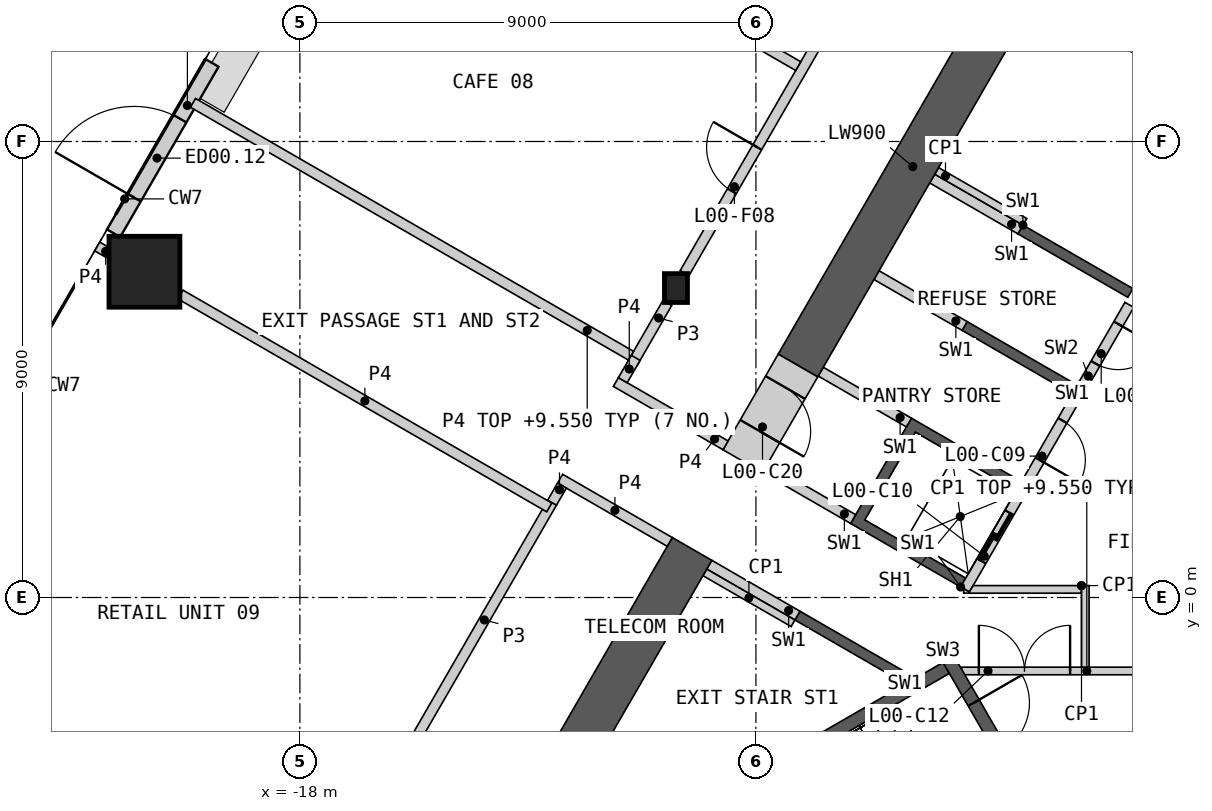
"""IFC4 building model, lengths in metres.
Left out: names, types, materials, properties, quantities, classifications, styles, units other than length and angle.
Written with IfcOpenShell. Run it as: python <this file> out.ifc"""

import sys

from ifc_helpers import new_model, si_unit, direction, frame, frame_2d, origin, origin_2d, place, context, subcontext, project, spatial, polyline, rectangle, hollow_rectangle, i_section, outline, extrude, element, fill, save


model = new_model("IFC4")
c1 = context("Model", 3, precision=1e-05, world=origin(), true_north=direction((0.0, 1.0)))
c2 = subcontext(c1, "Body", "Model", "MODEL_VIEW")
j1 = project(units=[si_unit("LENGTHUNIT", "METRE"), si_unit("PLANEANGLEUNIT", "RADIAN")], contexts=[c1])
p1 = place(None, origin())
s1 = spatial("IfcSite", under=j1, at=p1, CompositionType="ELEMENT")
p2 = place(p1, origin())
s2 = spatial("IfcBuilding", under=s1, at=p2, CompositionType="ELEMENT")
p3 = place(p2, origin())
s3 = spatial("IfcBuildingStorey", under=s2, at=p3, CompositionType="ELEMENT", Elevation=0.0)
p4 = place(p3, frame((-21.068, 6.429, 0.0), z_axis=(0.0, 0.0, 1.0), x_axis=(1.0, 0.0, 0.0)))
e1 = element("IfcColumn", 1, at=p4, inside=s3, PredefinedType="COLUMN", context=c2, shape_type="SweptSolid", body=[
    extrude(hollow_rectangle(XDim=1.4, YDim=1.4, WallThickness=0.1, at=origin_2d()), origin(), (0.0, 0.0, 1.0), 10.0),
])
p5 = place(p3, frame((-10.578, 6.107, 0.0), z_axis=(0.0, 0.0, 1.0), x_axis=(1.0, 0.0, 0.0)))
e2 = element("IfcColumn", 2, at=p5, inside=s3, PredefinedType="COLUMN", context=c2, shape_type="SweptSolid", body=[
    extrude(i_section(OverallWidth=0.454, OverallDepth=0.57, WebThickness=0.078, FlangeThickness=0.125, at=origin_2d()), origin(), (0.0, 0.0, 1.0), 10.0),
])
p6 = place(p3, frame((-21.676, 7.189, 0.0), z_axis=(0.0, 0.0, 1.0), x_axis=(0.499994660107, 0.866028486751, 0.0)))
e3 = element("IfcWall", 3, at=p6, inside=s3, PredefinedType="SOLIDWALL", context=c2, shape_type="SweptSolid", body=[
    extrude(rectangle(XDim=3.882, YDim=0.3, at=frame_2d((1.941, 0.0))), origin(), (0.0, 0.0, 1.0), 4.6),
])
p7 = place(p6, frame((0.812, 0.0, 0.0)))
e4 = element("IfcOpeningElement", 4, at=p7, cuts=e3, PredefinedType="OPENING", context=c2, shape_type="SweptSolid", body=[
    extrude(rectangle(XDim=1.8, YDim=2.4, at=frame_2d((0.9, 1.2))), frame((0.0, 0.16, 0.0), z_axis=(0.0, -1.0, 0.0), x_axis=(1.0, 0.0, 0.0)), (0.0, 0.0, 1.0), 0.32),
])
p8 = place(p3, origin())
e5 = element("IfcWall", 5, at=p8, inside=s3, PredefinedType="SHEAR", context=c2, shape_type="SweptSolid", body=[
    extrude(outline(polyline([(-6.061, -1.697), (-8.231, -0.444), (-8.131, -0.271), (-5.96, -1.524), (-6.061, -1.697)])), origin(), (0.0, 0.0, 1.0), 9.55),
])
p9 = place(p3, origin())
e6 = element("IfcWall", 6, at=p9, inside=s3, PredefinedType="SHEAR", context=c2, shape_type="SweptSolid", body=[
    extrude(outline(polyline([(-4.96, 0.208), (-7.131, 1.461), (-5.931, 3.54), (-3.76, 2.287), (-3.861, 2.113), (-5.852, 3.263), (-6.852, 1.531), (-4.861, 0.381), (-4.96, 0.208)])), origin(), (0.0, 0.0, 1.0), 9.55),
])
p10 = place(p3, origin())
e7 = element("IfcWall", 7, at=p10, inside=s3, PredefinedType="SHEAR", context=c2, shape_type="SweptSolid", body=[
    extrude(outline(polyline([(-2.76, 4.019), (-4.931, 5.272), (-4.831, 5.445), (-2.66, 4.192), (-2.76, 4.019)])), origin(), (0.0, 0.0, 1.0), 9.55),
])
p11 = place(p3, origin())
e8 = element("IfcWall", 8, at=p11, inside=s3, PredefinedType="SHEAR", context=c2, shape_type="SweptSolid", body=[
    extrude(outline(polyline([(-3.731, 7.35), (-1.561, 6.097), (-1.66, 5.924), (-3.831, 7.177), (-3.731, 7.35)])), origin(), (0.0, 0.0, 1.0), 9.55),
])
p12 = place(p3, frame((-1.631, 5.776, 0.0), z_axis=(0.0, 0.0, 1.0), x_axis=(-0.499992876559, -0.866029516466, 0.0)))
e9 = element("IfcWall", 9, at=p12, inside=s3, PredefinedType="SOLIDWALL", context=c2, shape_type="SweptSolid", body=[
    extrude(rectangle(XDim=6.486, YDim=0.2, at=frame_2d((3.243, 0.0))), origin(), (0.0, 0.0, 1.0), 9.55),
])
p13 = place(p12, frame((0.437, 0.0, 0.0)))
e10 = element("IfcOpeningElement", 10, at=p13, cuts=e9, PredefinedType="OPENING", context=c2, shape_type="SweptSolid", body=[
    extrude(rectangle(XDim=0.9, YDim=2.1, at=frame_2d((0.45, 1.05))), frame((0.0, 0.11, 0.0), z_axis=(0.0, -1.0, 0.0), x_axis=(1.0, 0.0, 0.0)), (0.0, 0.0, 1.0), 0.22),
])
p14 = place(p12, frame((2.637, 0.0, 0.0)))
e11 = element("IfcOpeningElement", 11, at=p14, cuts=e9, PredefinedType="OPENING", context=c2, shape_type="SweptSolid", body=[
    extrude(rectangle(XDim=0.9, YDim=2.1, at=frame_2d((0.45, 1.05))), frame((0.0, 0.11, 0.0), z_axis=(0.0, -1.0, 0.0), x_axis=(1.0, 0.0, 0.0)), (0.0, 0.0, 1.0), 0.22),
])
p15 = place(p12, frame((4.737, 0.0, 0.0)))
e12 = element("IfcOpeningElement", 12, at=p15, cuts=e9, PredefinedType="OPENING", context=c2, shape_type="SweptSolid", body=[
    extrude(rectangle(XDim=1.1, YDim=2.1, at=frame_2d((0.55, 1.05))), frame((0.0, 0.11, 0.0), z_axis=(0.0, -1.0, 0.0), x_axis=(1.0, 0.0, 0.0)), (0.0, 0.0, 1.0), 0.22),
])
p16 = place(p3, frame((-3.781, 7.263, 0.0), z_axis=(0.0, 0.0, 1.0), x_axis=(-0.865983199114, 0.50007309351, 0.0)))
e13 = element("IfcWall", 13, at=p16, inside=s3, PredefinedType="SHEAR", context=c2, shape_type="SweptSolid", body=[
    extrude(rectangle(XDim=2.009, YDim=0.2, at=frame_2d((1.004, 0.0))), origin(), (0.0, 0.0, 1.0), 9.55),
])
p17 = place(p3, frame((-4.881, 5.358, 0.0), z_axis=(0.0, 0.0, 1.0), x_axis=(-0.866035824272, 0.499981950752, 0.0)))
e14 = element("IfcWall", 14, at=p17, inside=s3, PredefinedType="SHEAR", context=c2, shape_type="SweptSolid", body=[
    extrude(rectangle(XDim=2.009, YDim=0.2, at=frame_2d((1.004, 0.0))), origin(), (0.0, 0.0, 1.0), 9.55),
])
p18 = place(p3, frame((-5.981, 3.453, 0.0), z_axis=(0.0, 0.0, 1.0), x_axis=(-0.866013584312, 0.500020471368, 0.0)))
e15 = element("IfcWall", 15, at=p18, inside=s3, PredefinedType="SHEAR", context=c2, shape_type="SweptSolid", body=[
    extrude(rectangle(XDim=2.009, YDim=0.2, at=frame_2d((1.005, 0.0))), origin(), (0.0, 0.0, 1.0), 9.55),
])
p19 = place(p3, frame((-7.081, 1.548, 0.0), z_axis=(0.0, 0.0, 1.0), x_axis=(-0.865983199114, 0.50007309351, 0.0)))
e16 = element("IfcWall", 16, at=p19, inside=s3, PredefinedType="SHEAR", context=c2, shape_type="SweptSolid", body=[
    extrude(rectangle(XDim=2.009, YDim=0.2, at=frame_2d((1.004, 0.0))), origin(), (0.0, 0.0, 1.0), 9.55),
])
p20 = place(p3, frame((-8.181, -0.357, 0.0), z_axis=(0.0, 0.0, 1.0), x_axis=(-0.866035824272, 0.499981950752, 0.0)))
e17 = element("IfcWall", 17, at=p20, inside=s3, PredefinedType="SHEAR", context=c2, shape_type="SweptSolid", body=[
    extrude(rectangle(XDim=2.009, YDim=0.2, at=frame_2d((1.004, 0.0))), origin(), (0.0, 0.0, 1.0), 9.55),
])
p21 = place(p3, frame((-4.941, -1.45, 0.0), z_axis=(0.0, 0.0, 1.0), x_axis=(1.0, 0.0, 0.0)))
e18 = element("IfcWall", 18, at=p21, inside=s3, PredefinedType="PARTITIONING", context=c2, shape_type="SweptSolid", body=[
    extrude(rectangle(XDim=9.882, YDim=0.15, at=frame_2d((4.941, 0.0))), origin(), (0.0, 0.0, 1.0), 9.55),
])
p22 = place(p21, frame((4.391, 0.0, 0.0)))
e19 = element("IfcOpeningElement", 19, at=p22, cuts=e18, PredefinedType="OPENING", context=c2, shape_type="SweptSolid", body=[
    extrude(rectangle(XDim=1.1, YDim=2.1, at=frame_2d((0.55, 1.05))), frame((0.0, 0.085, 0.0), z_axis=(0.0, -1.0, 0.0), x_axis=(1.0, 0.0, 0.0)), (0.0, 0.0, 1.0), 0.17),
])
p23 = place(p21, frame((0.341, 0.0, 0.0)))
e20 = element("IfcOpeningElement", 20, at=p23, cuts=e18, PredefinedType="OPENING", context=c2, shape_type="SweptSolid", body=[
    extrude(rectangle(XDim=1.8, YDim=2.1, at=frame_2d((0.9, 1.05))), frame((0.0, 0.085, 0.0), z_axis=(0.0, -1.0, 0.0), x_axis=(1.0, 0.0, 0.0)), (0.0, 0.0, 1.0), 0.17),
])
p24 = place(p3, origin())
e21 = element("IfcWall", 21, at=p24, inside=s3, PredefinedType="PARTITIONING", context=c2, shape_type="SweptSolid", body=[
    extrude(outline(polyline([(-2.575, 0.235), (-2.575, 0.085), (-4.9, 0.085), (-4.9, 0.173), (-4.787, 0.108), (-4.714, 0.235), (-2.575, 0.235)])), origin(), (0.0, 0.0, 1.0), 9.55),
])
p25 = place(p3, origin())
e22 = element("IfcWall", 22, at=p25, inside=s3, PredefinedType="PARTITIONING", context=c2, shape_type="SweptSolid", body=[
    extrude(outline(polyline([(-2.575, 0.235), (-2.425, 0.235), (-2.425, -1.375), (-2.575, -1.375), (-2.575, 0.235)])), origin(), (0.0, 0.0, 1.0), 9.55),
])
p26 = place(p3, origin())
e23 = element("IfcWall", 23, at=p26, inside=s3, PredefinedType="SHEAR", context=c2, shape_type="SweptSolid", body=[
    extrude(outline(polyline([(-5.307, -1.281), (-10.374, -4.206), (-10.032, -4.298), (-5.182, -1.498), (-5.307, -1.281)])), origin(), (0.0, 0.0, 1.0), 9.55),
])
p27 = place(p3, frame((-5.199, -1.219, 0.0), z_axis=(0.0, 0.0, 1.0), x_axis=(0.499982516597, -0.866035497597, 0.0)))
e24 = element("IfcWall", 24, at=p27, inside=s3, PredefinedType="SHEAR", context=c2, shape_type="SweptSolid", body=[
    extrude(rectangle(XDim=3.088, YDim=0.25, at=frame_2d((1.544, 0.0))), origin(), (0.0, 0.0, 1.0), 9.55),
])
p28 = place(p27, frame((0.994, 0.0, 0.0)))
e25 = element("IfcOpeningElement", 25, at=p28, cuts=e24, PredefinedType="OPENING", context=c2, shape_type="SweptSolid", body=[
    extrude(rectangle(XDim=1.1, YDim=2.1, at=frame_2d((0.55, 1.05))), frame((0.0, 0.135, 0.0), z_axis=(0.0, -1.0, 0.0), x_axis=(1.0, 0.0, 0.0)), (0.0, 0.0, 1.0), 0.27),
])
for number, where, z_axis, x_axis in (
    (26, (-8.268, -0.509, 0.0), (0.0, 0.0, 1.0), (-0.866, 0.5, 0.0)),
    (27, (-3.693, 7.415, 0.0), (0.0, 0.0, 1.0), (-0.866, 0.5, 0.0)),
):
    element("IfcWall", number, at=place(p3, frame(where, z_axis=z_axis, x_axis=x_axis)), inside=s3, PredefinedType="PARTITIONING", context=c2, shape_type="SweptSolid", body=[
        extrude(rectangle(XDim=2.009, YDim=0.15, at=frame_2d((1.004, 0.0))), origin(), (0.0, 0.0, 1.0), 9.55),
    ])
p29 = place(p3, frame((-3.637, 12.43, 0.0), z_axis=(0.0, 0.0, 1.0), x_axis=(-0.500011513458, -0.866018756384, 0.0)))
e28 = element("IfcWall", 28, at=p29, inside=s3, PredefinedType="SHEAR", context=c2, shape_type="SweptSolid", body=[
    extrude(rectangle(XDim=9.066, YDim=0.9, at=frame_2d((4.533, 0.0))), origin(), (0.0, 0.0, 1.0), 9.55),
])
p30 = place(p3, frame((-10.26, 0.958, 0.0), z_axis=(0.0, 0.0, 1.0), x_axis=(-0.499993887256, -0.86602893295, 0.0)))
e29 = element("IfcWall", 29, at=p30, inside=s3, PredefinedType="SHEAR", context=c2, shape_type="SweptSolid", body=[
    extrude(rectangle(XDim=4.646, YDim=0.9, at=frame_2d((2.323, 0.0))), origin(), (0.0, 0.0, 1.0), 9.55),
])
p31 = place(p3, frame((-8.17, 4.579, 0.0), z_axis=(0.0, 0.0, 1.0), x_axis=(-0.499945432413, -0.866056906104, 0.0)))
e30 = element("IfcWall", 30, at=p31, inside=s3, PredefinedType="SHEAR", context=c2, shape_type="SweptSolid", body=[
    extrude(rectangle(XDim=2.18, YDim=0.9, at=frame_2d((1.09, 0.0))), origin(), (0.0, 0.0, 1.0), 9.55),
])
p32 = place(p31, frame((0.5, 0.0, 0.0)))
e31 = element("IfcOpeningElement", 31, at=p32, cuts=e30, PredefinedType="OPENING", context=c2, shape_type="SweptSolid", body=[
    extrude(rectangle(XDim=1.0, YDim=2.1, at=frame_2d((0.5, 1.05))), frame((0.0, 0.46, 0.0), z_axis=(0.0, -1.0, 0.0), x_axis=(1.0, 0.0, 0.0)), (0.0, 0.0, 1.0), 0.92),
])
p33 = place(p3, frame((-10.408, 6.402, 0.0), z_axis=(0.0, 0.0, 1.0), x_axis=(0.499985793049, 0.866033606016, 0.0)))
e32 = element("IfcWall", 32, at=p33, inside=s3, PredefinedType="PARTITIONING", context=c2, shape_type="SweptSolid", body=[
    extrude(rectangle(XDim=9.898, YDim=0.2, at=frame_2d((4.949, 0.0))), origin(), (0.0, 0.0, 1.0), 9.55),
])
p34 = place(p33, frame((1.869, 0.0, 0.0)))
e33 = element("IfcOpeningElement", 33, at=p34, cuts=e32, PredefinedType="OPENING", context=c2, shape_type="SweptSolid", body=[
    extrude(rectangle(XDim=1.0, YDim=2.1, at=frame_2d((0.5, 1.05))), frame((0.0, 0.11, 0.0), z_axis=(0.0, -1.0, 0.0), x_axis=(1.0, 0.0, 0.0)), (0.0, 0.0, 1.0), 0.22),
])
p35 = place(p3, frame((-15.698, -2.759, 0.0), z_axis=(0.0, 0.0, 1.0), x_axis=(0.500125484666, 0.865952943056, 0.0)))
e34 = element("IfcWall", 34, at=p35, inside=s3, PredefinedType="PARTITIONING", context=c2, shape_type="SweptSolid", body=[
    extrude(rectangle(XDim=5.348, YDim=0.2, at=frame_2d((2.674, 0.0))), origin(), (0.0, 0.0, 1.0), 9.55),
])
p36 = place(p3, frame((-11.432, 4.627, 0.0), z_axis=(0.0, 0.0, 1.0), x_axis=(0.499650385877, 0.866227159522, 0.0)))
e35 = element("IfcWall", 35, at=p36, inside=s3, PredefinedType="PARTITIONING", context=c2, shape_type="SweptSolid", body=[
    extrude(rectangle(XDim=1.369, YDim=0.2, at=frame_2d((0.684, 0.0))), origin(), (0.0, 0.0, 1.0), 9.55),
])
p37 = place(p3, frame((-15.392, 14.66, 0.0), z_axis=(0.0, 0.0, 1.0), x_axis=(0.866027244746, -0.499996811348, 0.0)))
e36 = element("IfcWall", 36, at=p37, inside=s3, PredefinedType="PARTITIONING", context=c2, shape_type="SweptSolid", body=[
    extrude(rectangle(XDim=8.345, YDim=0.2, at=frame_2d((4.172, 0.0))), origin(), (0.0, 0.0, 1.0), 9.55),
])
p38 = place(p3, frame((-20.109, 9.763, 0.0), z_axis=(0.0, 0.0, 1.0), x_axis=(0.866017364883, -0.500013923527, 0.0)))
e37 = element("IfcWall", 37, at=p38, inside=s3, PredefinedType="PARTITIONING", context=c2, shape_type="SweptSolid", body=[
    extrude(rectangle(XDim=9.982, YDim=0.2, at=frame_2d((4.991, 0.0))), origin(), (0.0, 0.0, 1.0), 9.55),
])
p39 = place(p3, frame((-20.358, 5.98, 0.0), z_axis=(0.0, 0.0, 1.0), x_axis=(0.866028870366, -0.499993995656, 0.0)))
e38 = element("IfcWall", 38, at=p39, inside=s3, PredefinedType="PARTITIONING", context=c2, shape_type="SweptSolid", body=[
    extrude(rectangle(XDim=8.405, YDim=0.2, at=frame_2d((4.203, 0.0))), origin(), (0.0, 0.0, 1.0), 9.55),
])
p40 = place(p3, frame((-11.764, 4.253, 0.0), z_axis=(0.0, 0.0, 1.0), x_axis=(0.86600986831, -0.500026907266, 0.0)))
e39 = element("IfcWall", 39, at=p40, inside=s3, PredefinedType="PARTITIONING", context=c2, shape_type="SweptSolid", body=[
    extrude(rectangle(XDim=2.499, YDim=0.2, at=frame_2d((1.25, 0.0))), origin(), (0.0, 0.0, 1.0), 9.55),
])
p41 = place(p3, frame((-12.865, 2.346, 0.0), z_axis=(0.0, 0.0, 1.0), x_axis=(0.866034292756, -0.499984603534, 0.0)))
e40 = element("IfcWall", 40, at=p41, inside=s3, PredefinedType="PARTITIONING", context=c2, shape_type="SweptSolid", body=[
    extrude(rectangle(XDim=2.499, YDim=0.2, at=frame_2d((1.25, 0.0))), origin(), (0.0, 0.0, 1.0), 9.55),
])
p42 = place(p3, frame((-11.627, 4.289, 0.0), z_axis=(0.0, 0.0, 1.0), x_axis=(0.499750133086, 0.866169616461, 0.0)))
e41 = element("IfcWall", 41, at=p42, inside=s3, PredefinedType="PARTITIONING", context=c2, shape_type="SweptSolid", body=[
    extrude(rectangle(XDim=0.509, YDim=0.2, at=frame_2d((0.254, 0.0))), origin(), (0.0, 0.0, 1.0), 9.55),
])
p43 = place(p3, frame((-13.023, 1.872, 0.0), z_axis=(0.0, 0.0, 1.0), x_axis=(0.500392655802, 0.865798585133, 0.0)))
e42 = element("IfcWall", 42, at=p43, inside=s3, PredefinedType="PARTITIONING", context=c2, shape_type="SweptSolid", body=[
    extrude(rectangle(XDim=0.389, YDim=0.2, at=frame_2d((0.194, 0.0))), origin(), (0.0, 0.0, 1.0), 9.55),
])
p44 = place(p3, frame((-22.0, 6.928, 0.0), z_axis=(0.0, 0.0, 1.0), x_axis=(0.866185586049, -0.49972245349, 0.0)))
e43 = element("IfcWall", 43, at=p44, inside=s3, PredefinedType="PARTITIONING", context=c2, shape_type="SweptSolid", body=[
    extrude(rectangle(XDim=0.257, YDim=0.2, at=frame_2d((0.128, 0.0))), origin(), (0.0, 0.0, 1.0), 9.55),
])
p45 = place(p7, origin())
e44 = element("IfcDoor", 44, at=p45, inside=s3, OperationType="DOUBLE_DOOR_SINGLE_SWING", PredefinedType="DOOR", context=c2, shape_type="SweptSolid", body=[
    extrude(rectangle(XDim=1.8, YDim=2.4, at=frame_2d((0.9, 1.2))), frame((0.0, 0.025, 0.0), z_axis=(0.0, -1.0, 0.0), x_axis=(1.0, 0.0, 0.0)), (0.0, 0.0, 1.0), 0.05),
])
fill(e4, e44)
p46 = place(p13, origin())
e45 = element("IfcDoor", 45, at=p46, inside=s3, OperationType="SINGLE_SWING_LEFT", PredefinedType="DOOR", context=c2, shape_type="SweptSolid", body=[
    extrude(rectangle(XDim=0.9, YDim=2.1, at=frame_2d((0.45, 1.05))), frame((0.0, 0.025, 0.0), z_axis=(0.0, -1.0, 0.0), x_axis=(1.0, 0.0, 0.0)), (0.0, 0.0, 1.0), 0.05),
])
fill(e10, e45)
p47 = place(p14, origin())
e46 = element("IfcDoor", 46, at=p47, inside=s3, OperationType="SINGLE_SWING_RIGHT", PredefinedType="DOOR", context=c2, shape_type="SweptSolid", body=[
    extrude(rectangle(XDim=0.9, YDim=2.1, at=frame_2d((0.45, 1.05))), frame((0.0, 0.025, 0.0), z_axis=(0.0, -1.0, 0.0), x_axis=(1.0, 0.0, 0.0)), (0.0, 0.0, 1.0), 0.05),
])
fill(e11, e46)
p48 = place(p15, origin())
e47 = element("IfcDoor", 47, at=p48, inside=s3, OperationType="SLIDING_TO_LEFT", PredefinedType="DOOR", context=c2, shape_type="SweptSolid", body=[
    extrude(rectangle(XDim=1.1, YDim=2.1, at=frame_2d((0.55, 1.05))), frame((0.0, 0.025, 0.0), z_axis=(0.0, -1.0, 0.0), x_axis=(1.0, 0.0, 0.0)), (0.0, 0.0, 1.0), 0.05),
])
fill(e12, e47)
p49 = place(p23, origin())
e48 = element("IfcDoor", 48, at=p49, inside=s3, OperationType="DOUBLE_DOOR_SINGLE_SWING", PredefinedType="DOOR", context=c2, shape_type="SweptSolid", body=[
    extrude(rectangle(XDim=1.8, YDim=2.1, at=frame_2d((0.9, 1.05))), frame((0.0, 0.025, 0.0), z_axis=(0.0, -1.0, 0.0), x_axis=(1.0, 0.0, 0.0)), (0.0, 0.0, 1.0), 0.05),
])
fill(e20, e48)
p50 = place(p28, origin())
e49 = element("IfcDoor", 49, at=p50, inside=s3, OperationType="SINGLE_SWING_LEFT", PredefinedType="DOOR", context=c2, shape_type="SweptSolid", body=[
    extrude(rectangle(XDim=1.1, YDim=2.1, at=frame_2d((0.55, 1.05))), frame((0.0, 0.025, 0.0), z_axis=(0.0, -1.0, 0.0), x_axis=(1.0, 0.0, 0.0)), (0.0, 0.0, 1.0), 0.05),
])
fill(e25, e49)
p51 = place(p32, origin())
e50 = element("IfcDoor", 50, at=p51, inside=s3, OperationType="SINGLE_SWING_RIGHT", PredefinedType="DOOR", context=c2, shape_type="SweptSolid", body=[
    extrude(rectangle(XDim=1.0, YDim=2.1, at=frame_2d((0.5, 1.05))), frame((0.0, 0.205, 0.0), z_axis=(0.0, -1.0, 0.0), x_axis=(1.0, 0.0, 0.0)), (0.0, 0.0, 1.0), 0.05),
])
fill(e31, e50)
p52 = place(p34, origin())
e51 = element("IfcDoor", 51, at=p52, inside=s3, OperationType="SINGLE_SWING_RIGHT", PredefinedType="DOOR", context=c2, shape_type="SweptSolid", body=[
    extrude(rectangle(XDim=1.0, YDim=2.1, at=frame_2d((0.5, 1.05))), frame((0.0, 0.025, 0.0), z_axis=(0.0, -1.0, 0.0), x_axis=(1.0, 0.0, 0.0)), (0.0, 0.0, 1.0), 0.05),
])
fill(e33, e51)
save(model, sys.argv[1])
